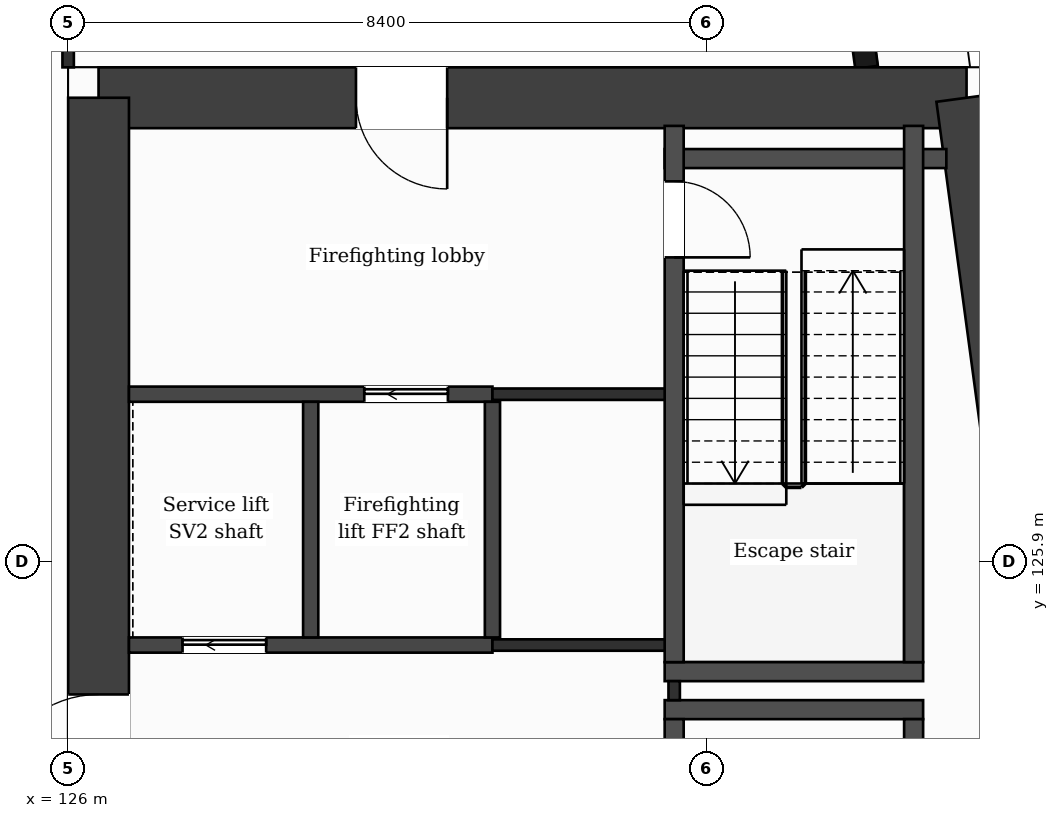
"""IFC4 building model, lengths in metres.
Left out: names, types, materials, properties, quantities, classifications, styles, units other than length and angle.
Written with IfcOpenShell. Run it as: python <this file> out.ifc"""

import sys

from ifc_helpers import new_model, si_unit, direction, frame, frame_2d, origin, place, context, subcontext, project, spatial, rectangle, extrude, element, fill, save


model = new_model("IFC4")
c1 = context("Model", 3, precision=1e-05, world=origin(), true_north=direction((0.0, 1.0)))
c2 = subcontext(c1, "Body", "Model", "MODEL_VIEW")
j1 = project(units=[si_unit("LENGTHUNIT", "METRE"), si_unit("PLANEANGLEUNIT", "RADIAN")], contexts=[c1])
p1 = place(None, origin())
s1 = spatial("IfcSite", under=j1, at=p1, CompositionType="ELEMENT")
p2 = place(p1, origin())
s2 = spatial("IfcBuilding", under=s1, at=p2, CompositionType="ELEMENT")
p3 = place(p2, frame((0.0, 0.0, 202.2)))
s3 = spatial("IfcBuildingStorey", under=s2, at=p3, CompositionType="ELEMENT", Elevation=202.2)
p4 = place(p3, frame((126.4, 132.0, 0.0), z_axis=(0.0, 0.0, 1.0), x_axis=(1.0, 0.0, 0.0)))
e1 = element("IfcWall", 1, at=p4, inside=s3, PredefinedType="SHEAR", context=c2, shape_type="SweptSolid", body=[
    extrude(rectangle(XDim=11.42, YDim=0.8, at=frame_2d((5.71, 0.0))), origin(), (0.0, 0.0, 1.0), 3.7),
])
p5 = place(p4, frame((3.386, 0.0, 0.0)))
e2 = element("IfcOpeningElement", 2, at=p5, cuts=e1, PredefinedType="OPENING", context=c2, shape_type="SweptSolid", body=[
    extrude(rectangle(XDim=1.2, YDim=2.1, at=frame_2d((0.6, 1.05))), frame((0.0, 0.41, 0.0), z_axis=(0.0, -1.0, 0.0), x_axis=(1.0, 0.0, 0.0)), (0.0, 0.0, 1.0), 0.82),
])
p6 = place(p3, frame((137.82, 132.0, 0.0), z_axis=(0.0, 0.0, 1.0), x_axis=(0.133408347329, -0.991061154956, 0.0)))
e3 = element("IfcWall", 3, at=p6, inside=s3, PredefinedType="SHEAR", context=c2, shape_type="SweptSolid", body=[
    extrude(rectangle(XDim=21.391, YDim=0.8, at=frame_2d((10.696, 0.0))), origin(), (0.0, 0.0, 1.0), 3.7),
])
p7 = place(p3, frame((126.4, 110.8, 0.0), z_axis=(0.0, 0.0, 1.0), x_axis=(0.0, 1.0, 0.0)))
e4 = element("IfcWall", 4, at=p7, inside=s3, PredefinedType="SHEAR", context=c2, shape_type="SweptSolid", body=[
    extrude(rectangle(XDim=21.2, YDim=0.8, at=frame_2d((10.6, 0.0))), origin(), (0.0, 0.0, 1.0), 3.7),
])
p8 = place(p7, frame((11.95, 0.0, 0.0)))
e5 = element("IfcOpeningElement", 5, at=p8, cuts=e4, PredefinedType="OPENING", context=c2, shape_type="SweptSolid", body=[
    extrude(rectangle(XDim=1.4, YDim=2.1, at=frame_2d((0.7, 1.05))), frame((0.0, 0.41, 0.0), z_axis=(0.0, -1.0, 0.0), x_axis=(1.0, 0.0, 0.0)), (0.0, 0.0, 1.0), 0.82),
])
p9 = place(p3, frame((136.504, 132.4, 0.0), z_axis=(0.0, 0.0, 1.0), x_axis=(-0.133399697462, 0.99106231929, 0.0)))
e6 = element("IfcWall", 6, at=p9, inside=s3, PredefinedType="SOLIDWALL", context=c2, shape_type="SweptSolid", body=[
    extrude(rectangle(XDim=6.74, YDim=0.3, at=frame_2d((3.37, 0.0))), origin(), (0.0, 0.0, 1.0), 3.38),
])
p10 = place(p9, frame((1.115, 0.0, 0.0)))
e7 = element("IfcOpeningElement", 7, at=p10, cuts=e6, PredefinedType="OPENING", context=c2, shape_type="SweptSolid", body=[
    extrude(rectangle(XDim=1.2, YDim=2.4, at=frame_2d((0.6, 1.2))), frame((0.0, 0.16, 0.0), z_axis=(0.0, -1.0, 0.0), x_axis=(1.0, 0.0, 0.0)), (0.0, 0.0, 1.0), 0.32),
])
p11 = place(p9, frame((3.835, 0.0, 0.9)))
e8 = element("IfcOpeningElement", 8, at=p11, cuts=e6, PredefinedType="OPENING", context=c2, shape_type="SweptSolid", body=[
    extrude(rectangle(XDim=2.4, YDim=2.1, at=frame_2d((1.2, 1.05))), frame((0.0, 0.16, 0.0), z_axis=(0.0, -1.0, 0.0), x_axis=(1.0, 0.0, 0.0)), (0.0, 0.0, 1.0), 0.32),
])
for number, where, z_axis, x_axis in (
    (9, (133.848, 123.95, 0.0), (0.0, 0.0, 1.0), (1.0, 0.0, 0.0)),
    (10, (133.848, 124.45, 0.0), (0.0, 0.0, 1.0), (1.0, 0.0, 0.0)),
):
    element("IfcWall", number, at=place(p3, frame(where, z_axis=z_axis, x_axis=x_axis)), inside=s3, PredefinedType="PARTITIONING", context=c2, shape_type="SweptSolid", body=[
        extrude(rectangle(XDim=3.4, YDim=0.25, at=frame_2d((1.7, 0.0))), origin(), (0.0, 0.0, 1.0), 3.38),
    ])
p12 = place(p3, frame((126.8, 124.8, 0.0), z_axis=(0.0, 0.0, 1.0), x_axis=(1.0, 0.0, 0.0)))
e11 = element("IfcWall", 11, at=p12, inside=s3, PredefinedType="PARTITIONING", context=c2, shape_type="SweptSolid", body=[
    extrude(rectangle(XDim=4.782, YDim=0.2, at=frame_2d((2.391, 0.0))), origin(), (0.0, 0.0, 1.0), 3.38),
])
p13 = place(p12, frame((0.705, 0.0, 0.0)))
e12 = element("IfcOpeningElement", 12, at=p13, cuts=e11, PredefinedType="OPENING", context=c2, shape_type="SweptSolid", body=[
    extrude(rectangle(XDim=1.1, YDim=2.1, at=frame_2d((0.55, 1.05))), frame((0.0, 0.11, 0.0), z_axis=(0.0, -1.0, 0.0), x_axis=(1.0, 0.0, 0.0)), (0.0, 0.0, 1.0), 0.22),
])
p14 = place(p3, frame((131.582, 124.8, 0.0), z_axis=(0.0, 0.0, 1.0), x_axis=(1.0, 0.0, 0.0)))
e13 = element("IfcWall", 13, at=p14, inside=s3, PredefinedType="PARTITIONING", context=c2, shape_type="SweptSolid", body=[
    extrude(rectangle(XDim=2.516, YDim=0.15, at=frame_2d((1.258, 0.0))), origin(), (0.0, 0.0, 1.0), 3.38),
])
p15 = place(p3, frame((126.8, 128.1, 0.0), z_axis=(0.0, 0.0, 1.0), x_axis=(1.0, 0.0, 0.0)))
e14 = element("IfcWall", 14, at=p15, inside=s3, PredefinedType="PARTITIONING", context=c2, shape_type="SweptSolid", body=[
    extrude(rectangle(XDim=4.782, YDim=0.2, at=frame_2d((2.391, 0.0))), origin(), (0.0, 0.0, 1.0), 3.38),
])
p16 = place(p15, frame((3.096, 0.0, 0.0)))
e15 = element("IfcOpeningElement", 15, at=p16, cuts=e14, PredefinedType="OPENING", context=c2, shape_type="SweptSolid", body=[
    extrude(rectangle(XDim=1.1, YDim=2.1, at=frame_2d((0.55, 1.05))), frame((0.0, 0.11, 0.0), z_axis=(0.0, -1.0, 0.0), x_axis=(1.0, 0.0, 0.0)), (0.0, 0.0, 1.0), 0.22),
])
p17 = place(p3, frame((131.582, 128.1, 0.0), z_axis=(0.0, 0.0, 1.0), x_axis=(1.0, 0.0, 0.0)))
e16 = element("IfcWall", 16, at=p17, inside=s3, PredefinedType="PARTITIONING", context=c2, shape_type="SweptSolid", body=[
    extrude(rectangle(XDim=2.391, YDim=0.15, at=frame_2d((1.195, 0.0))), origin(), (0.0, 0.0, 1.0), 3.38),
])
p18 = place(p3, frame((133.848, 131.2, 0.0), z_axis=(0.0, 0.0, 1.0), x_axis=(1.0, 0.0, 0.0)))
e17 = element("IfcWall", 17, at=p18, inside=s3, PredefinedType="PARTITIONING", context=c2, shape_type="SweptSolid", body=[
    extrude(rectangle(XDim=3.706, YDim=0.25, at=frame_2d((1.853, 0.0))), origin(), (0.0, 0.0, 1.0), 3.38),
])
p19 = place(p3, frame((126.0, 132.4, 0.0), z_axis=(0.0, 0.0, 1.0), x_axis=(0.0, 1.0, 0.0)))
e18 = element("IfcWall", 18, at=p19, inside=s3, PredefinedType="PARTITIONING", context=c2, shape_type="SweptSolid", body=[
    extrude(rectangle(XDim=1.325, YDim=0.15, at=frame_2d((0.663, 0.0))), origin(), (0.0, 0.0, 1.0), 3.38),
])
for number, where, z_axis, x_axis in (
    (19, (129.191, 124.9, 0.0), (0.0, 0.0, 1.0), (0.0, 1.0, 0.0)),
    (20, (131.582, 124.9, 0.0), (0.0, 0.0, 1.0), (0.0, 1.0, 0.0)),
):
    element("IfcWall", number, at=place(p3, frame(where, z_axis=z_axis, x_axis=x_axis)), inside=s3, PredefinedType="PARTITIONING", context=c2, shape_type="SweptSolid", body=[
        extrude(rectangle(XDim=3.1, YDim=0.2, at=frame_2d((1.55, 0.0))), origin(), (0.0, 0.0, 1.0), 3.38),
    ])
p20 = place(p3, frame((133.973, 124.075, 0.0), z_axis=(0.0, 0.0, 1.0), x_axis=(0.0, 1.0, 0.0)))
e21 = element("IfcWall", 21, at=p20, inside=s3, PredefinedType="PARTITIONING", context=c2, shape_type="SweptSolid", body=[
    extrude(rectangle(XDim=0.25, YDim=0.15, at=frame_2d((0.125, 0.0))), origin(), (0.0, 0.0, 1.0), 3.38),
])
p21 = place(p3, frame((133.973, 116.77, 0.0), z_axis=(0.0, 0.0, 1.0), x_axis=(0.0, 1.0, 0.0)))
e22 = element("IfcWall", 22, at=p21, inside=s3, PredefinedType="PARTITIONING", context=c2, shape_type="SweptSolid", body=[
    extrude(rectangle(XDim=7.055, YDim=0.25, at=frame_2d((3.527, 0.0))), origin(), (0.0, 0.0, 1.0), 3.38),
])
p22 = place(p21, frame((5.755, 0.0, 0.0)))
e23 = element("IfcOpeningElement", 23, at=p22, cuts=e22, PredefinedType="OPENING", context=c2, shape_type="SweptSolid", body=[
    extrude(rectangle(XDim=0.95, YDim=2.1, at=frame_2d((0.475, 1.05))), frame((0.0, 0.135, 0.0), z_axis=(0.0, -1.0, 0.0), x_axis=(1.0, 0.0, 0.0)), (0.0, 0.0, 1.0), 0.27),
])
p23 = place(p3, frame((133.973, 124.575, 0.0), z_axis=(0.0, 0.0, 1.0), x_axis=(0.0, 1.0, 0.0)))
e24 = element("IfcWall", 24, at=p23, inside=s3, PredefinedType="PARTITIONING", context=c2, shape_type="SweptSolid", body=[
    extrude(rectangle(XDim=7.055, YDim=0.25, at=frame_2d((3.527, 0.0))), origin(), (0.0, 0.0, 1.0), 3.38),
])
p24 = place(p23, frame((5.325, 0.0, 0.0)))
e25 = element("IfcOpeningElement", 25, at=p24, cuts=e24, PredefinedType="OPENING", context=c2, shape_type="SweptSolid", body=[
    extrude(rectangle(XDim=1.0, YDim=2.1, at=frame_2d((0.5, 1.05))), frame((0.0, 0.135, 0.0), z_axis=(0.0, -1.0, 0.0), x_axis=(1.0, 0.0, 0.0)), (0.0, 0.0, 1.0), 0.27),
])
for number, where, z_axis, x_axis in (
    (26, (137.123, 116.77, 0.0), (0.0, 0.0, 1.0), (0.0, 1.0, 0.0)),
    (27, (137.123, 124.575, 0.0), (0.0, 0.0, 1.0), (0.0, 1.0, 0.0)),
):
    element("IfcWall", number, at=place(p3, frame(where, z_axis=z_axis, x_axis=x_axis)), inside=s3, PredefinedType="PARTITIONING", context=c2, shape_type="SweptSolid", body=[
        extrude(rectangle(XDim=7.055, YDim=0.25, at=frame_2d((3.527, 0.0))), origin(), (0.0, 0.0, 1.0), 3.38),
    ])
p25 = place(p16, origin())
e28 = element("IfcDoor", 28, at=p25, inside=s3, OperationType="SLIDING_TO_LEFT", PredefinedType="DOOR", context=c2, shape_type="SweptSolid", body=[
    extrude(rectangle(XDim=1.1, YDim=2.1, at=frame_2d((0.55, 1.05))), frame((0.0, 0.025, 0.0), z_axis=(0.0, -1.0, 0.0), x_axis=(1.0, 0.0, 0.0)), (0.0, 0.0, 1.0), 0.05),
])
fill(e15, e28)
p26 = place(p13, origin())
e29 = element("IfcDoor", 29, at=p26, inside=s3, OperationType="SLIDING_TO_LEFT", PredefinedType="DOOR", context=c2, shape_type="SweptSolid", body=[
    extrude(rectangle(XDim=1.1, YDim=2.1, at=frame_2d((0.55, 1.05))), frame((0.0, 0.025, 0.0), z_axis=(0.0, -1.0, 0.0), x_axis=(1.0, 0.0, 0.0)), (0.0, 0.0, 1.0), 0.05),
])
fill(e12, e29)
p27 = place(p24, origin())
e30 = element("IfcDoor", 30, at=p27, inside=s3, OperationType="SINGLE_SWING_LEFT", PredefinedType="DOOR", context=c2, shape_type="SweptSolid", body=[
    extrude(rectangle(XDim=1.0, YDim=2.1, at=frame_2d((0.5, 1.05))), frame((0.0, 0.025, 0.0), z_axis=(0.0, -1.0, 0.0), x_axis=(1.0, 0.0, 0.0)), (0.0, 0.0, 1.0), 0.05),
])
fill(e25, e30)
p28 = place(p5, origin())
e31 = element("IfcDoor", 31, at=p28, inside=s3, OperationType="SINGLE_SWING_RIGHT", PredefinedType="DOOR", context=c2, shape_type="SweptSolid", body=[
    extrude(rectangle(XDim=1.2, YDim=2.1, at=frame_2d((0.6, 1.05))), frame((0.0, 0.025, 0.0), z_axis=(0.0, -1.0, 0.0), x_axis=(1.0, 0.0, 0.0)), (0.0, 0.0, 1.0), 0.05),
])
fill(e2, e31)
p29 = place(p8, origin())
e32 = element("IfcDoor", 32, at=p29, inside=s3, OperationType="SINGLE_SWING_LEFT", PredefinedType="DOOR", context=c2, shape_type="SweptSolid", body=[
    extrude(rectangle(XDim=1.4, YDim=2.1, at=frame_2d((0.7, 1.05))), frame((0.0, 0.025, 0.0), z_axis=(0.0, -1.0, 0.0), x_axis=(1.0, 0.0, 0.0)), (0.0, 0.0, 1.0), 0.05),
])
fill(e5, e32)
save(model, sys.argv[1])
